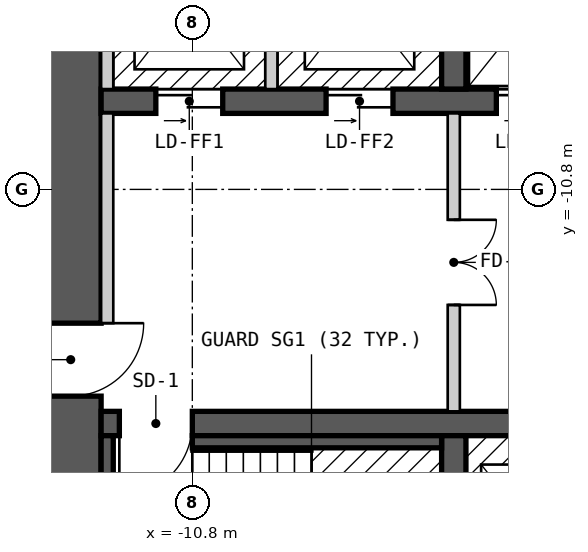
"""IFC4 building model, lengths in metres.
Left out: names, types, materials, properties, quantities, classifications, styles, units other than length and angle.
Written with IfcOpenShell. Run it as: python <this file> out.ifc"""

import sys

from ifc_helpers import new_model, si_unit, direction, frame, frame_2d, origin, place, context, subcontext, project, spatial, rectangle, extrude, element, fill, save


model = new_model("IFC4")
c1 = context("Model", 3, precision=1e-05, world=origin(), true_north=direction((0.0, 1.0)))
c2 = subcontext(c1, "Body", "Model", "MODEL_VIEW")
j1 = project(units=[si_unit("LENGTHUNIT", "METRE"), si_unit("PLANEANGLEUNIT", "RADIAN")], contexts=[c1])
p1 = place(None, origin())
s1 = spatial("IfcSite", under=j1, at=p1, CompositionType="ELEMENT")
p2 = place(p1, origin())
s2 = spatial("IfcBuilding", under=s1, at=p2, CompositionType="ELEMENT")
p3 = place(p2, frame((0.0, 0.0, 66.0)))
s3 = spatial("IfcBuildingStorey", under=s2, at=p3, CompositionType="ELEMENT", Elevation=66.0)
p4 = place(p3, frame((-12.8, -18.0, 0.0), z_axis=(0.0, 0.0, 1.0), x_axis=(0.0, 1.0, 0.0)))
e1 = element("IfcWall", 1, at=p4, inside=s3, PredefinedType="SHEAR", context=c2, shape_type="SweptSolid", body=[
    extrude(rectangle(XDim=12.0, YDim=1.0, at=frame_2d((6.0, 0.0))), origin(), (0.0, 0.0, 1.0), 5.7),
])
p5 = place(p4, frame((3.8, 0.0, 0.0)))
e2 = element("IfcOpeningElement", 2, at=p5, cuts=e1, PredefinedType="OPENING", context=c2, shape_type="SweptSolid", body=[
    extrude(rectangle(XDim=1.2, YDim=2.1, at=frame_2d((0.6, 1.05))), frame((0.0, 0.51, 0.0), z_axis=(0.0, -1.0, 0.0), x_axis=(1.0, 0.0, 0.0)), (0.0, 0.0, 1.0), 1.02),
])
p6 = place(p3, frame((-12.3, -14.65, 0.0), z_axis=(0.0, 0.0, 1.0), x_axis=(1.0, 0.0, 0.0)))
e3 = element("IfcWall", 3, at=p6, inside=s3, PredefinedType="SHEAR", context=c2, shape_type="SweptSolid", body=[
    extrude(rectangle(XDim=24.6, YDim=0.4, at=frame_2d((12.3, 0.0))), origin(), (0.0, 0.0, 1.0), 5.7),
])
p7 = place(p6, frame((1.5, 0.0, 0.0), z_axis=(0.0, 0.0, 1.0), x_axis=(-1.0, 0.0, 0.0)))
e4 = element("IfcOpeningElement", 4, at=p7, cuts=e3, PredefinedType="OPENING", context=c2, shape_type="SweptSolid", body=[
    extrude(rectangle(XDim=1.2, YDim=2.1, at=frame_2d((0.6, 1.05))), frame((0.0, 0.21, 0.0), z_axis=(0.0, -1.0, 0.0), x_axis=(1.0, 0.0, 0.0)), (0.0, 0.0, 1.0), 0.42),
])
p8 = place(p6, frame((24.35, 0.0, 0.0), z_axis=(0.0, 0.0, 1.0), x_axis=(-1.0, 0.0, 0.0)))
e5 = element("IfcOpeningElement", 5, at=p8, cuts=e3, PredefinedType="OPENING", context=c2, shape_type="SweptSolid", body=[
    extrude(rectangle(XDim=1.2, YDim=2.1, at=frame_2d((0.6, 1.05))), frame((0.0, 0.21, 0.0), z_axis=(0.0, -1.0, 0.0), x_axis=(1.0, 0.0, 0.0)), (0.0, 0.0, 1.0), 0.42),
])
p9 = place(p6, frame((16.8, 0.0, 0.0), z_axis=(0.0, 0.0, 1.0), x_axis=(-1.0, 0.0, 0.0)))
e6 = element("IfcOpeningElement", 6, at=p9, cuts=e3, PredefinedType="OPENING", context=c2, shape_type="SweptSolid", body=[
    extrude(rectangle(XDim=1.0, YDim=2.1, at=frame_2d((0.5, 1.05))), frame((0.0, 0.21, 0.0), z_axis=(0.0, -1.0, 0.0), x_axis=(1.0, 0.0, 0.0)), (0.0, 0.0, 1.0), 0.42),
])
p10 = place(p6, frame((18.55, 0.0, 0.0), z_axis=(0.0, 0.0, 1.0), x_axis=(-1.0, 0.0, 0.0)))
e7 = element("IfcOpeningElement", 7, at=p10, cuts=e3, PredefinedType="OPENING", context=c2, shape_type="SweptSolid", body=[
    extrude(rectangle(XDim=0.9, YDim=2.1, at=frame_2d((0.45, 1.05))), frame((0.0, 0.21, 0.0), z_axis=(0.0, -1.0, 0.0), x_axis=(1.0, 0.0, 0.0)), (0.0, 0.0, 1.0), 0.42),
])
p11 = place(p3, frame((-12.3, -9.35, 0.0), z_axis=(0.0, 0.0, 1.0), x_axis=(1.0, 0.0, 0.0)))
e8 = element("IfcWall", 8, at=p11, inside=s3, PredefinedType="SHEAR", context=c2, shape_type="SweptSolid", body=[
    extrude(rectangle(XDim=22.5, YDim=0.4, at=frame_2d((11.25, 0.0))), origin(), (0.0, 0.0, 1.0), 5.7),
])
p12 = place(p11, frame((0.9, 0.0, 0.0)))
e9 = element("IfcOpeningElement", 9, at=p12, cuts=e8, PredefinedType="OPENING", context=c2, shape_type="SweptSolid", body=[
    extrude(rectangle(XDim=1.1, YDim=2.1, at=frame_2d((0.55, 1.05))), frame((0.0, 0.21, 0.0), z_axis=(0.0, -1.0, 0.0), x_axis=(1.0, 0.0, 0.0)), (0.0, 0.0, 1.0), 0.42),
])
p13 = place(p11, frame((3.7, 0.0, 0.0)))
e10 = element("IfcOpeningElement", 10, at=p13, cuts=e8, PredefinedType="OPENING", context=c2, shape_type="SweptSolid", body=[
    extrude(rectangle(XDim=1.1, YDim=2.1, at=frame_2d((0.55, 1.05))), frame((0.0, 0.21, 0.0), z_axis=(0.0, -1.0, 0.0), x_axis=(1.0, 0.0, 0.0)), (0.0, 0.0, 1.0), 0.42),
])
p14 = place(p11, frame((6.5, 0.0, 0.0)))
e11 = element("IfcOpeningElement", 11, at=p14, cuts=e8, PredefinedType="OPENING", context=c2, shape_type="SweptSolid", body=[
    extrude(rectangle(XDim=1.1, YDim=2.1, at=frame_2d((0.55, 1.05))), frame((0.0, 0.21, 0.0), z_axis=(0.0, -1.0, 0.0), x_axis=(1.0, 0.0, 0.0)), (0.0, 0.0, 1.0), 0.42),
])
p15 = place(p11, frame((8.8, 0.0, 0.0)))
e12 = element("IfcOpeningElement", 12, at=p15, cuts=e8, PredefinedType="OPENING", context=c2, shape_type="SweptSolid", body=[
    extrude(rectangle(XDim=1.1, YDim=2.1, at=frame_2d((0.55, 1.05))), frame((0.0, 0.21, 0.0), z_axis=(0.0, -1.0, 0.0), x_axis=(1.0, 0.0, 0.0)), (0.0, 0.0, 1.0), 0.42),
])
p16 = place(p11, frame((11.1, 0.0, 0.0)))
e13 = element("IfcOpeningElement", 13, at=p16, cuts=e8, PredefinedType="OPENING", context=c2, shape_type="SweptSolid", body=[
    extrude(rectangle(XDim=1.1, YDim=2.1, at=frame_2d((0.55, 1.05))), frame((0.0, 0.21, 0.0), z_axis=(0.0, -1.0, 0.0), x_axis=(1.0, 0.0, 0.0)), (0.0, 0.0, 1.0), 0.42),
])
p17 = place(p11, frame((13.4, 0.0, 0.0)))
e14 = element("IfcOpeningElement", 14, at=p17, cuts=e8, PredefinedType="OPENING", context=c2, shape_type="SweptSolid", body=[
    extrude(rectangle(XDim=1.1, YDim=2.1, at=frame_2d((0.55, 1.05))), frame((0.0, 0.21, 0.0), z_axis=(0.0, -1.0, 0.0), x_axis=(1.0, 0.0, 0.0)), (0.0, 0.0, 1.0), 0.42),
])
p18 = place(p11, frame((15.7, 0.0, 0.0)))
e15 = element("IfcOpeningElement", 15, at=p18, cuts=e8, PredefinedType="OPENING", context=c2, shape_type="SweptSolid", body=[
    extrude(rectangle(XDim=1.1, YDim=2.1, at=frame_2d((0.55, 1.05))), frame((0.0, 0.21, 0.0), z_axis=(0.0, -1.0, 0.0), x_axis=(1.0, 0.0, 0.0)), (0.0, 0.0, 1.0), 0.42),
])
p19 = place(p11, frame((18.0, 0.0, 0.0)))
e16 = element("IfcOpeningElement", 16, at=p19, cuts=e8, PredefinedType="OPENING", context=c2, shape_type="SweptSolid", body=[
    extrude(rectangle(XDim=1.1, YDim=2.1, at=frame_2d((0.55, 1.05))), frame((0.0, 0.21, 0.0), z_axis=(0.0, -1.0, 0.0), x_axis=(1.0, 0.0, 0.0)), (0.0, 0.0, 1.0), 0.42),
])
p20 = place(p11, frame((20.4, 0.0, 0.0)))
e17 = element("IfcOpeningElement", 17, at=p20, cuts=e8, PredefinedType="OPENING", context=c2, shape_type="SweptSolid", body=[
    extrude(rectangle(XDim=1.1, YDim=2.1, at=frame_2d((0.55, 1.05))), frame((0.0, 0.21, 0.0), z_axis=(0.0, -1.0, 0.0), x_axis=(1.0, 0.0, 0.0)), (0.0, 0.0, 1.0), 0.42),
])
for number, where, z_axis, x_axis in (
    (18, (-6.5, -18.0, 0.0), (0.0, 0.0, 1.0), (0.0, 1.0, 0.0)),
    (19, (-6.5, -9.15, 0.0), (0.0, 0.0, 1.0), (0.0, 1.0, 0.0)),
):
    element("IfcWall", number, at=place(p3, frame(where, z_axis=z_axis, x_axis=x_axis)), inside=s3, PredefinedType="SHEAR", context=c2, shape_type="SweptSolid", body=[
        extrude(rectangle(XDim=3.15, YDim=0.4, at=frame_2d((1.575, 0.0))), origin(), (0.0, 0.0, 1.0), 5.7),
    ])
p21 = place(p3, frame((-12.2, -18.0, 0.0), z_axis=(0.0, 0.0, 1.0), x_axis=(0.0, 1.0, 0.0)))
e20 = element("IfcWall", 20, at=p21, inside=s3, PredefinedType="SOLIDWALL", context=c2, shape_type="SweptSolid", body=[
    extrude(rectangle(XDim=3.15, YDim=0.2, at=frame_2d((1.575, 0.0))), origin(), (0.0, 0.0, 1.0), 5.7),
])
p22 = place(p3, frame((-12.2, -13.0, 0.0), z_axis=(0.0, 0.0, 1.0), x_axis=(0.0, 1.0, 0.0)))
e21 = element("IfcWall", 21, at=p22, inside=s3, PredefinedType="PARTITIONING", context=c2, shape_type="SweptSolid", body=[
    extrude(rectangle(XDim=3.45, YDim=0.2, at=frame_2d((1.725, 0.0))), origin(), (0.0, 0.0, 1.0), 5.7),
])
p23 = place(p3, frame((-12.2, -9.15, 0.0), z_axis=(0.0, 0.0, 1.0), x_axis=(0.0, 1.0, 0.0)))
e22 = element("IfcWall", 22, at=p23, inside=s3, PredefinedType="SOLIDWALL", context=c2, shape_type="SweptSolid", body=[
    extrude(rectangle(XDim=3.15, YDim=0.2, at=frame_2d((1.575, 0.0))), origin(), (0.0, 0.0, 1.0), 5.7),
])
p24 = place(p3, frame((-10.8, -14.95, 0.0), z_axis=(0.0, 0.0, 1.0), x_axis=(1.0, 0.0, 0.0)))
e23 = element("IfcWall", 23, at=p24, inside=s3, PredefinedType="SOLIDWALL", context=c2, shape_type="SweptSolid", body=[
    extrude(rectangle(XDim=4.1, YDim=0.2, at=frame_2d((2.05, 0.0))), origin(), (0.0, 0.0, 1.0), 5.7),
])
p25 = place(p3, frame((-9.5, -9.15, 0.0), z_axis=(0.0, 0.0, 1.0), x_axis=(0.0, 1.0, 0.0)))
e24 = element("IfcWall", 24, at=p25, inside=s3, PredefinedType="SOLIDWALL", context=c2, shape_type="SweptSolid", body=[
    extrude(rectangle(XDim=2.95, YDim=0.2, at=frame_2d((1.475, 0.0))), origin(), (0.0, 0.0, 1.0), 5.7),
])
p26 = place(p3, frame((-6.5, -14.45, 0.0), z_axis=(0.0, 0.0, 1.0), x_axis=(0.0, 1.0, 0.0)))
e25 = element("IfcWall", 25, at=p26, inside=s3, PredefinedType="PARTITIONING", context=c2, shape_type="SweptSolid", body=[
    extrude(rectangle(XDim=4.9, YDim=0.2, at=frame_2d((2.45, 0.0))), origin(), (0.0, 0.0, 1.0), 5.7),
])
p27 = place(p26, frame((3.15, 0.0, 0.0), z_axis=(0.0, 0.0, 1.0), x_axis=(-1.0, 0.0, 0.0)))
e26 = element("IfcOpeningElement", 26, at=p27, cuts=e25, PredefinedType="OPENING", context=c2, shape_type="SweptSolid", body=[
    extrude(rectangle(XDim=1.4, YDim=2.1, at=frame_2d((0.7, 1.05))), frame((0.0, 0.11, 0.0), z_axis=(0.0, -1.0, 0.0), x_axis=(1.0, 0.0, 0.0)), (0.0, 0.0, 1.0), 0.22),
])
p28 = place(p12, origin())
e27 = element("IfcDoor", 27, at=p28, inside=s3, OperationType="DOUBLE_DOOR_SLIDING", PredefinedType="DOOR", context=c2, shape_type="SweptSolid", body=[
    extrude(rectangle(XDim=1.1, YDim=2.1, at=frame_2d((0.55, 1.05))), frame((0.0, 0.025, 0.0), z_axis=(0.0, -1.0, 0.0), x_axis=(1.0, 0.0, 0.0)), (0.0, 0.0, 1.0), 0.05),
])
fill(e9, e27)
p29 = place(p13, origin())
e28 = element("IfcDoor", 28, at=p29, inside=s3, OperationType="DOUBLE_DOOR_SLIDING", PredefinedType="DOOR", context=c2, shape_type="SweptSolid", body=[
    extrude(rectangle(XDim=1.1, YDim=2.1, at=frame_2d((0.55, 1.05))), frame((0.0, 0.025, 0.0), z_axis=(0.0, -1.0, 0.0), x_axis=(1.0, 0.0, 0.0)), (0.0, 0.0, 1.0), 0.05),
])
fill(e10, e28)
p30 = place(p14, origin())
e29 = element("IfcDoor", 29, at=p30, inside=s3, OperationType="DOUBLE_DOOR_SLIDING", PredefinedType="DOOR", context=c2, shape_type="SweptSolid", body=[
    extrude(rectangle(XDim=1.1, YDim=2.1, at=frame_2d((0.55, 1.05))), frame((0.0, 0.025, 0.0), z_axis=(0.0, -1.0, 0.0), x_axis=(1.0, 0.0, 0.0)), (0.0, 0.0, 1.0), 0.05),
])
fill(e11, e29)
p31 = place(p7, origin())
e30 = element("IfcDoor", 30, at=p31, inside=s3, OperationType="SINGLE_SWING_RIGHT", PredefinedType="DOOR", context=c2, shape_type="SweptSolid", body=[
    extrude(rectangle(XDim=1.2, YDim=2.1, at=frame_2d((0.6, 1.05))), frame((0.0, 0.025, 0.0), z_axis=(0.0, -1.0, 0.0), x_axis=(1.0, 0.0, 0.0)), (0.0, 0.0, 1.0), 0.05),
])
fill(e4, e30)
p32 = place(p5, origin())
e31 = element("IfcDoor", 31, at=p32, inside=s3, OperationType="SINGLE_SWING_RIGHT", PredefinedType="DOOR", context=c2, shape_type="SweptSolid", body=[
    extrude(rectangle(XDim=1.2, YDim=2.1, at=frame_2d((0.6, 1.05))), frame((0.0, 0.025, 0.0), z_axis=(0.0, -1.0, 0.0), x_axis=(1.0, 0.0, 0.0)), (0.0, 0.0, 1.0), 0.05),
])
fill(e2, e31)
p33 = place(p27, origin())
e32 = element("IfcDoor", 32, at=p33, inside=s3, OperationType="DOUBLE_DOOR_SINGLE_SWING", PredefinedType="DOOR", context=c2, shape_type="SweptSolid", body=[
    extrude(rectangle(XDim=1.4, YDim=2.1, at=frame_2d((0.7, 1.05))), frame((0.0, 0.025, 0.0), z_axis=(0.0, -1.0, 0.0), x_axis=(1.0, 0.0, 0.0)), (0.0, 0.0, 1.0), 0.05),
])
fill(e26, e32)
save(model, sys.argv[1])
